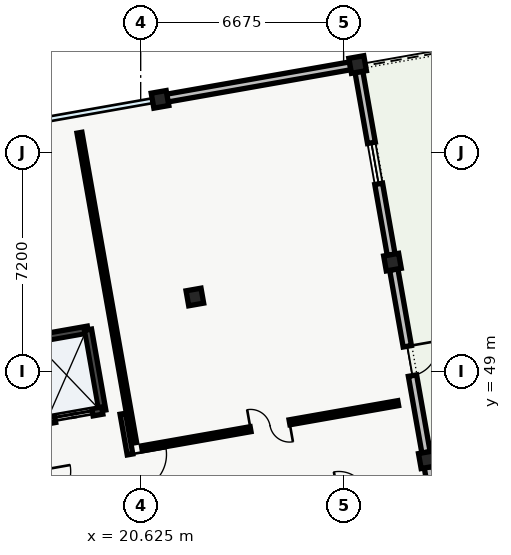
"""IFC4 building model, lengths in metres.
Left out: names, types, materials, properties, quantities, classifications, styles, units other than length and angle.
Written with IfcOpenShell. Run it as: python <this file> out.ifc"""

import sys

from ifc_helpers import new_model, si_unit, direction, frame, frame_2d, origin, origin_2d, place, context, subcontext, project, spatial, rectangle, extrude, element, fill, save


model = new_model("IFC4")
c1 = context("Model", 3, precision=1e-05, world=origin(), true_north=direction((0.0, 1.0)))
c2 = subcontext(c1, "Body", "Model", "MODEL_VIEW")
j1 = project(units=[si_unit("LENGTHUNIT", "METRE"), si_unit("PLANEANGLEUNIT", "RADIAN")], contexts=[c1])
p1 = place(None, origin())
s1 = spatial("IfcSite", under=j1, at=p1, CompositionType="ELEMENT")
p2 = place(p1, origin())
s2 = spatial("IfcBuilding", under=s1, at=p2, CompositionType="ELEMENT")
p3 = place(p2, frame((0.0, 0.0, 45.0)))
s3 = spatial("IfcBuildingStorey", under=s2, at=p3, CompositionType="ELEMENT", Elevation=45.0)
for number, where, z_axis, x_axis in (
    (1, (22.407, 51.448, 0.0), (0.0, 0.0, 1.0), (0.985, 0.174, 0.0)),
    (2, (21.261, 57.948, 0.0), (0.0, 0.0, 1.0), (0.985, 0.174, 0.0)),
    (3, (30.053, 46.094, 0.0), (0.0, 0.0, 1.0), (0.985, 0.174, 0.0)),
    (4, (28.907, 52.594, 0.0), (0.0, 0.0, 1.0), (0.985, 0.174, 0.0)),
    (5, (27.761, 59.094, 0.0), (0.0, 0.0, 1.0), (0.985, 0.174, 0.0)),
):
    element("IfcColumn", number, at=place(p3, frame(where, z_axis=z_axis, x_axis=x_axis)), inside=s3, PredefinedType="COLUMN", context=c2, shape_type="SweptSolid", body=[
        extrude(rectangle(XDim=0.5, YDim=0.5, at=origin_2d()), origin(), (0.0, 0.0, 1.0), 4.02),
    ])
p4 = place(p3, frame((21.502, 57.99, 0.0), z_axis=(0.0, 0.0, 1.0), x_axis=(0.984807282173, 0.173650847905, 0.0)))
e6 = element("IfcWall", 6, at=p4, inside=s3, PredefinedType="STANDARD", context=c2, shape_type="SweptSolid", body=[
    extrude(rectangle(XDim=6.11, YDim=0.26, at=frame_2d((3.055, 0.0))), origin(), (0.0, 0.0, 1.0), 3.555),
])
p5 = place(p3, frame((27.803, 58.852, 0.0), z_axis=(0.0, 0.0, 1.0), x_axis=(0.173650847905, -0.984807282173, 0.0)))
e7 = element("IfcWall", 7, at=p5, inside=s3, PredefinedType="STANDARD", context=c2, shape_type="SweptSolid", body=[
    extrude(rectangle(XDim=6.11, YDim=0.26, at=frame_2d((3.055, 0.0))), origin(), (0.0, 0.0, 1.0), 3.555),
])
p6 = place(p5, frame((2.37, 0.0, 0.95)))
e8 = element("IfcOpeningElement", 8, at=p6, cuts=e7, PredefinedType="OPENING", context=c2, shape_type="SweptSolid", body=[
    extrude(rectangle(XDim=1.37, YDim=1.42, at=frame_2d((0.685, 0.71))), frame((0.0, 0.13, 0.0), z_axis=(0.0, -1.0, 0.0), x_axis=(1.0, 0.0, 0.0)), (0.0, 0.0, 1.0), 0.26),
])
p7 = place(p3, frame((28.949, 52.353, 0.0), z_axis=(0.0, 0.0, 1.0), x_axis=(0.173650847905, -0.984807282173, 0.0)))
e9 = element("IfcWall", 9, at=p7, inside=s3, PredefinedType="STANDARD", context=c2, shape_type="SweptSolid", body=[
    extrude(rectangle(XDim=6.11, YDim=0.275, at=frame_2d((3.055, 0.0))), origin(), (0.0, 0.0, 1.0), 3.555),
])
p8 = place(p7, frame((2.565, 0.0, 0.0)))
e10 = element("IfcOpeningElement", 10, at=p8, cuts=e9, PredefinedType="OPENING", context=c2, shape_type="SweptSolid", body=[
    extrude(rectangle(XDim=0.98, YDim=2.15, at=frame_2d((0.49, 1.075))), frame((0.0, 0.137, 0.0), z_axis=(0.0, -1.0, 0.0), x_axis=(1.0, 0.0, 0.0)), (0.0, 0.0, 1.0), 0.275),
])
p9 = place(p3, frame((30.095, 45.853, 0.0), z_axis=(0.0, 0.0, 1.0), x_axis=(0.173657681232, -0.98480607723, 0.0)))
e11 = element("IfcWall", 11, at=p9, inside=s3, PredefinedType="STANDARD", context=c2, shape_type="SweptSolid", body=[
    extrude(rectangle(XDim=6.11, YDim=0.29, at=frame_2d((3.055, 0.0))), origin(), (0.0, 0.0, 1.0), 3.555),
])
p10 = place(p9, frame((2.46, 0.0, 0.95)))
e12 = element("IfcOpeningElement", 12, at=p10, cuts=e11, PredefinedType="OPENING", context=c2, shape_type="SweptSolid", body=[
    extrude(rectangle(XDim=1.19, YDim=1.38, at=frame_2d((0.595, 0.69))), frame((0.0, 0.145, 0.0), z_axis=(0.0, -1.0, 0.0), x_axis=(1.0, 0.0, 0.0)), (0.0, 0.0, 1.0), 0.29),
])
p11 = place(p3, frame((17.02, 50.041, 0.0), z_axis=(0.0, 0.0, 1.0), x_axis=(0.984815882103, 0.173602068988, 0.0)))
e13 = element("IfcWall", 13, at=p11, inside=s3, PredefinedType="SHEAR", context=c2, shape_type="SweptSolid", body=[
    extrude(rectangle(XDim=1.9, YDim=0.24, at=frame_2d((0.95, 0.0))), origin(), (0.0, 0.0, 1.0), 3.98),
])
p12 = place(p3, frame((18.891, 50.371, 0.0), z_axis=(0.0, 0.0, 1.0), x_axis=(0.173615102578, -0.98481358447, 0.0)))
e14 = element("IfcWall", 14, at=p12, inside=s3, PredefinedType="SHEAR", context=c2, shape_type="SweptSolid", body=[
    extrude(rectangle(XDim=2.7, YDim=0.24, at=frame_2d((1.35, 0.0))), origin(), (0.0, 0.0, 1.0), 3.98),
])
p13 = place(p3, frame((19.359, 47.712, 0.0), z_axis=(0.0, 0.0, 1.0), x_axis=(-0.984815882103, -0.173602068988, 0.0)))
e15 = element("IfcWall", 15, at=p13, inside=s3, PredefinedType="SHEAR", context=c2, shape_type="SweptSolid", body=[
    extrude(rectangle(XDim=1.9, YDim=0.24, at=frame_2d((0.95, 0.0))), origin(), (0.0, 0.0, 1.0), 3.98),
])
p14 = place(p13, frame((0.325, 0.0, 0.0)))
e16 = element("IfcOpeningElement", 16, at=p14, cuts=e15, PredefinedType="OPENING", context=c2, shape_type="SweptSolid", body=[
    extrude(rectangle(XDim=1.25, YDim=2.2, at=frame_2d((0.625, 1.1))), frame((0.0, 0.12, 0.0), z_axis=(0.0, -1.0, 0.0), x_axis=(1.0, 0.0, 0.0)), (0.0, 0.0, 1.0), 0.24),
])
p15 = place(p3, frame((20.63, 44.25, 0.0), z_axis=(0.0, 0.0, 1.0), x_axis=(-0.173621956536, 0.984812376145, 0.0)))
e17 = element("IfcWall", 17, at=p15, inside=s3, PredefinedType="SOLIDWALL", context=c2, shape_type="SweptSolid", body=[
    extrude(rectangle(XDim=3.41, YDim=0.185, at=frame_2d((1.705, 0.0))), origin(), (0.0, 0.0, 1.0), 3.65),
])
p16 = place(p15, frame((0.85, 0.0, 0.0)))
e18 = element("IfcOpeningElement", 18, at=p16, cuts=e17, PredefinedType="OPENING", context=c2, shape_type="SweptSolid", body=[
    extrude(rectangle(XDim=1.2, YDim=2.15, at=frame_2d((0.6, 1.075))), frame((0.0, 0.093, 0.0), z_axis=(0.0, -1.0, 0.0), x_axis=(1.0, 0.0, 0.0)), (0.0, 0.0, 1.0), 0.185),
])
p17 = place(p3, frame((20.665, 46.469, 0.0), z_axis=(0.0, 0.0, 1.0), x_axis=(0.984804798714, 0.173664931489, 0.0)))
e19 = element("IfcWall", 19, at=p17, inside=s3, PredefinedType="PARTITIONING", context=c2, shape_type="SweptSolid", body=[
    extrude(rectangle(XDim=8.56, YDim=0.165, at=frame_2d((4.28, 0.0))), origin(), (0.0, 0.0, 1.0), 3.65),
])
p18 = place(p17, frame((3.63, 0.0, 0.0)))
e20 = element("IfcOpeningElement", 20, at=p18, cuts=e19, PredefinedType="OPENING", context=c2, shape_type="SweptSolid", body=[
    extrude(rectangle(XDim=1.3, YDim=2.18, at=frame_2d((0.65, 1.09))), frame((0.0, 0.083, 0.0), z_axis=(0.0, -1.0, 0.0), x_axis=(1.0, 0.0, 0.0)), (0.0, 0.0, 1.0), 0.165),
])
p19 = place(p3, frame((18.611, 56.851, 0.0), z_axis=(0.0, 0.0, 1.0), x_axis=(0.173654930775, -0.984806562233, 0.0)))
e21 = element("IfcWall", 21, at=p19, inside=s3, PredefinedType="PARTITIONING", context=c2, shape_type="SweptSolid", body=[
    extrude(rectangle(XDim=10.36, YDim=0.165, at=frame_2d((5.18, 0.0))), origin(), (0.0, 0.0, 1.0), 3.65),
])
p20 = place(p6, origin())
e22 = element("IfcWindow", 22, at=p20, inside=s3, PartitioningType="SINGLE_PANEL", PredefinedType="WINDOW", context=c2, shape_type="SweptSolid", body=[
    extrude(rectangle(XDim=1.37, YDim=1.42, at=frame_2d((0.685, 0.71))), frame((0.0, 0.03, 0.0), z_axis=(0.0, -1.0, 0.0), x_axis=(1.0, 0.0, 0.0)), (0.0, 0.0, 1.0), 0.06),
])
fill(e8, e22)
p21 = place(p8, origin())
e23 = element("IfcDoor", 23, at=p21, inside=s3, OperationType="SINGLE_SWING_LEFT", PredefinedType="DOOR", context=c2, shape_type="SweptSolid", body=[
    extrude(rectangle(XDim=0.98, YDim=2.15, at=frame_2d((0.49, 1.075))), frame((0.0, 0.025, 0.0), z_axis=(0.0, -1.0, 0.0), x_axis=(1.0, 0.0, 0.0)), (0.0, 0.0, 1.0), 0.05),
])
fill(e10, e23)
p22 = place(p14, origin())
e24 = element("IfcDoor", 24, at=p22, inside=s3, OperationType="SLIDING_TO_RIGHT", PredefinedType="DOOR", context=c2, shape_type="SweptSolid", body=[
    extrude(rectangle(XDim=1.25, YDim=2.2, at=frame_2d((0.625, 1.1))), frame((0.0, 0.025, 0.0), z_axis=(0.0, -1.0, 0.0), x_axis=(1.0, 0.0, 0.0)), (0.0, 0.0, 1.0), 0.05),
])
fill(e16, e24)
p23 = place(p16, origin())
e25 = element("IfcDoor", 25, at=p23, inside=s3, OperationType="SINGLE_SWING_RIGHT", PredefinedType="DOOR", context=c2, shape_type="SweptSolid", body=[
    extrude(rectangle(XDim=1.2, YDim=2.15, at=frame_2d((0.6, 1.075))), frame((0.0, 0.025, 0.0), z_axis=(0.0, -1.0, 0.0), x_axis=(1.0, 0.0, 0.0)), (0.0, 0.0, 1.0), 0.05),
])
fill(e18, e25)
p24 = place(p18, origin())
e26 = element("IfcDoor", 26, at=p24, inside=s3, OperationType="DOUBLE_DOOR_SINGLE_SWING", PredefinedType="DOOR", context=c2, shape_type="SweptSolid", body=[
    extrude(rectangle(XDim=1.3, YDim=2.18, at=frame_2d((0.65, 1.09))), frame((0.0, 0.025, 0.0), z_axis=(0.0, -1.0, 0.0), x_axis=(1.0, 0.0, 0.0)), (0.0, 0.0, 1.0), 0.05),
])
fill(e20, e26)
save(model, sys.argv[1])
